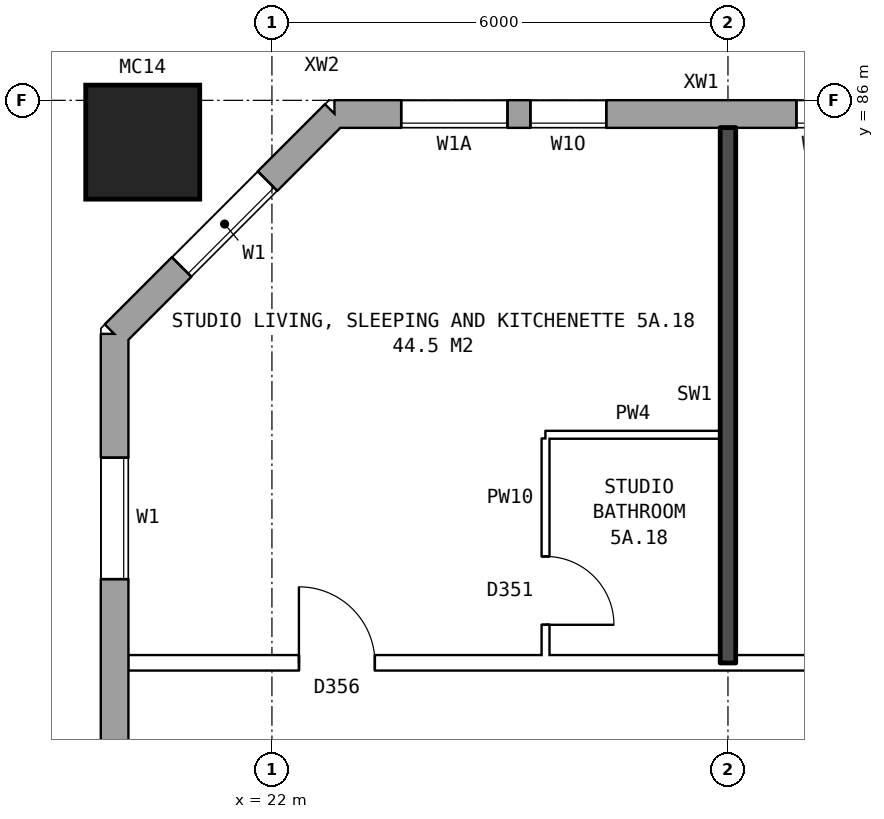
"""IFC4 building model, lengths in metres.
Left out: names, types, materials, properties, quantities, classifications, styles, units other than length and angle.
Written with IfcOpenShell. Run it as: python <this file> out.ifc"""

import sys

from ifc_helpers import new_model, si_unit, direction, frame, frame_2d, origin, origin_2d, place, context, subcontext, project, spatial, rectangle, hollow_rectangle, extrude, element, fill, save


model = new_model("IFC4")
c1 = context("Model", 3, precision=1e-05, world=origin(), true_north=direction((0.0, 1.0)))
c2 = subcontext(c1, "Body", "Model", "MODEL_VIEW")
j1 = project(units=[si_unit("LENGTHUNIT", "METRE"), si_unit("PLANEANGLEUNIT", "RADIAN")], contexts=[c1])
p1 = place(None, origin())
s1 = spatial("IfcSite", under=j1, at=p1, CompositionType="ELEMENT")
p2 = place(p1, origin())
s2 = spatial("IfcBuilding", under=s1, at=p2, CompositionType="ELEMENT")
p3 = place(p2, frame((0.0, 0.0, 22.6)))
s3 = spatial("IfcBuildingStorey", under=s2, at=p3, CompositionType="ELEMENT", Elevation=22.6)
p4 = place(p3, frame((20.3, 85.45, 0.0), z_axis=(0.0, 0.0, 1.0), x_axis=(1.0, 0.0, 0.0)))
e1 = element("IfcColumn", 1, at=p4, inside=s3, PredefinedType="COLUMN", context=c2, shape_type="SweptSolid", body=[
    extrude(hollow_rectangle(XDim=1.5, YDim=1.5, WallThickness=0.08, at=origin_2d()), origin(), (0.0, 0.0, 1.0), 3.1),
])
p5 = place(p3, frame((72.925, 85.82, 0.0), z_axis=(0.0, 0.0, 1.0), x_axis=(-1.0, 0.0, 0.0)))
e2 = element("IfcWall", 2, at=p5, inside=s3, PredefinedType="STANDARD", context=c2, shape_type="SweptSolid", body=[
    extrude(rectangle(XDim=50.101, YDim=0.36, at=frame_2d((25.05, 0.0))), origin(), (0.0, 0.0, 1.0), 2.85),
])
p6 = place(p5, frame((0.625, 0.0, 0.8)))
e3 = element("IfcOpeningElement", 3, at=p6, cuts=e2, PredefinedType="OPENING", context=c2, shape_type="SweptSolid", body=[
    extrude(rectangle(XDim=1.6, YDim=1.8, at=frame_2d((0.8, 0.9))), frame((0.0, 0.19, 0.0), z_axis=(0.0, -1.0, 0.0), x_axis=(1.0, 0.0, 0.0)), (0.0, 0.0, 1.0), 0.38),
])
p7 = place(p5, frame((3.125, 0.0, 1.7)))
e4 = element("IfcOpeningElement", 4, at=p7, cuts=e2, PredefinedType="OPENING", context=c2, shape_type="SweptSolid", body=[
    extrude(rectangle(XDim=0.8, YDim=0.9, at=frame_2d((0.4, 0.45))), frame((0.0, 0.19, 0.0), z_axis=(0.0, -1.0, 0.0), x_axis=(1.0, 0.0, 0.0)), (0.0, 0.0, 1.0), 0.38),
])
p8 = place(p5, frame((6.625, 0.0, 0.8)))
e5 = element("IfcOpeningElement", 5, at=p8, cuts=e2, PredefinedType="OPENING", context=c2, shape_type="SweptSolid", body=[
    extrude(rectangle(XDim=1.6, YDim=1.8, at=frame_2d((0.8, 0.9))), frame((0.0, 0.19, 0.0), z_axis=(0.0, -1.0, 0.0), x_axis=(1.0, 0.0, 0.0)), (0.0, 0.0, 1.0), 0.38),
])
p9 = place(p5, frame((9.625, 0.0, 0.8)))
e6 = element("IfcOpeningElement", 6, at=p9, cuts=e2, PredefinedType="OPENING", context=c2, shape_type="SweptSolid", body=[
    extrude(rectangle(XDim=1.6, YDim=1.8, at=frame_2d((0.8, 0.9))), frame((0.0, 0.19, 0.0), z_axis=(0.0, -1.0, 0.0), x_axis=(1.0, 0.0, 0.0)), (0.0, 0.0, 1.0), 0.38),
])
p10 = place(p5, frame((12.625, 0.0, 0.8)))
e7 = element("IfcOpeningElement", 7, at=p10, cuts=e2, PredefinedType="OPENING", context=c2, shape_type="SweptSolid", body=[
    extrude(rectangle(XDim=1.6, YDim=1.8, at=frame_2d((0.8, 0.9))), frame((0.0, 0.19, 0.0), z_axis=(0.0, -1.0, 0.0), x_axis=(1.0, 0.0, 0.0)), (0.0, 0.0, 1.0), 0.38),
])
p11 = place(p5, frame((15.625, 0.0, 0.8)))
e8 = element("IfcOpeningElement", 8, at=p11, cuts=e2, PredefinedType="OPENING", context=c2, shape_type="SweptSolid", body=[
    extrude(rectangle(XDim=1.6, YDim=1.8, at=frame_2d((0.8, 0.9))), frame((0.0, 0.19, 0.0), z_axis=(0.0, -1.0, 0.0), x_axis=(1.0, 0.0, 0.0)), (0.0, 0.0, 1.0), 0.38),
])
p12 = place(p5, frame((18.625, 0.0, 0.8)))
e9 = element("IfcOpeningElement", 9, at=p12, cuts=e2, PredefinedType="OPENING", context=c2, shape_type="SweptSolid", body=[
    extrude(rectangle(XDim=1.6, YDim=1.8, at=frame_2d((0.8, 0.9))), frame((0.0, 0.19, 0.0), z_axis=(0.0, -1.0, 0.0), x_axis=(1.0, 0.0, 0.0)), (0.0, 0.0, 1.0), 0.38),
])
p13 = place(p5, frame((21.625, 0.0, 0.8)))
e10 = element("IfcOpeningElement", 10, at=p13, cuts=e2, PredefinedType="OPENING", context=c2, shape_type="SweptSolid", body=[
    extrude(rectangle(XDim=1.6, YDim=1.8, at=frame_2d((0.8, 0.9))), frame((0.0, 0.19, 0.0), z_axis=(0.0, -1.0, 0.0), x_axis=(1.0, 0.0, 0.0)), (0.0, 0.0, 1.0), 0.38),
])
p14 = place(p5, frame((24.625, 0.0, 0.8)))
e11 = element("IfcOpeningElement", 11, at=p14, cuts=e2, PredefinedType="OPENING", context=c2, shape_type="SweptSolid", body=[
    extrude(rectangle(XDim=1.6, YDim=1.8, at=frame_2d((0.8, 0.9))), frame((0.0, 0.19, 0.0), z_axis=(0.0, -1.0, 0.0), x_axis=(1.0, 0.0, 0.0)), (0.0, 0.0, 1.0), 0.38),
])
p15 = place(p5, frame((27.625, 0.0, 0.8)))
e12 = element("IfcOpeningElement", 12, at=p15, cuts=e2, PredefinedType="OPENING", context=c2, shape_type="SweptSolid", body=[
    extrude(rectangle(XDim=1.6, YDim=1.8, at=frame_2d((0.8, 0.9))), frame((0.0, 0.19, 0.0), z_axis=(0.0, -1.0, 0.0), x_axis=(1.0, 0.0, 0.0)), (0.0, 0.0, 1.0), 0.38),
])
p16 = place(p5, frame((30.625, 0.0, 0.8)))
e13 = element("IfcOpeningElement", 13, at=p16, cuts=e2, PredefinedType="OPENING", context=c2, shape_type="SweptSolid", body=[
    extrude(rectangle(XDim=1.6, YDim=1.8, at=frame_2d((0.8, 0.9))), frame((0.0, 0.19, 0.0), z_axis=(0.0, -1.0, 0.0), x_axis=(1.0, 0.0, 0.0)), (0.0, 0.0, 1.0), 0.38),
])
p17 = place(p5, frame((33.625, 0.0, 0.8)))
e14 = element("IfcOpeningElement", 14, at=p17, cuts=e2, PredefinedType="OPENING", context=c2, shape_type="SweptSolid", body=[
    extrude(rectangle(XDim=1.6, YDim=1.8, at=frame_2d((0.8, 0.9))), frame((0.0, 0.19, 0.0), z_axis=(0.0, -1.0, 0.0), x_axis=(1.0, 0.0, 0.0)), (0.0, 0.0, 1.0), 0.38),
])
p18 = place(p5, frame((36.625, 0.0, 0.8)))
e15 = element("IfcOpeningElement", 15, at=p18, cuts=e2, PredefinedType="OPENING", context=c2, shape_type="SweptSolid", body=[
    extrude(rectangle(XDim=1.6, YDim=1.8, at=frame_2d((0.8, 0.9))), frame((0.0, 0.19, 0.0), z_axis=(0.0, -1.0, 0.0), x_axis=(1.0, 0.0, 0.0)), (0.0, 0.0, 1.0), 0.38),
])
p19 = place(p5, frame((39.625, 0.0, 0.8)))
e16 = element("IfcOpeningElement", 16, at=p19, cuts=e2, PredefinedType="OPENING", context=c2, shape_type="SweptSolid", body=[
    extrude(rectangle(XDim=1.6, YDim=1.8, at=frame_2d((0.8, 0.9))), frame((0.0, 0.19, 0.0), z_axis=(0.0, -1.0, 0.0), x_axis=(1.0, 0.0, 0.0)), (0.0, 0.0, 1.0), 0.38),
])
p20 = place(p5, frame((41.525, 0.0, 0.8)))
e17 = element("IfcOpeningElement", 17, at=p20, cuts=e2, PredefinedType="OPENING", context=c2, shape_type="SweptSolid", body=[
    extrude(rectangle(XDim=1.6, YDim=1.8, at=frame_2d((0.8, 0.9))), frame((0.0, 0.19, 0.0), z_axis=(0.0, -1.0, 0.0), x_axis=(1.0, 0.0, 0.0)), (0.0, 0.0, 1.0), 0.38),
])
p21 = place(p5, frame((46.525, 0.0, 1.4)))
e18 = element("IfcOpeningElement", 18, at=p21, cuts=e2, PredefinedType="OPENING", context=c2, shape_type="SweptSolid", body=[
    extrude(rectangle(XDim=1.0, YDim=1.2, at=frame_2d((0.5, 0.6))), frame((0.0, 0.19, 0.0), z_axis=(0.0, -1.0, 0.0), x_axis=(1.0, 0.0, 0.0)), (0.0, 0.0, 1.0), 0.38),
])
p22 = place(p5, frame((5.475, 0.0, 0.8)))
e19 = element("IfcOpeningElement", 19, at=p22, cuts=e2, PredefinedType="OPENING", context=c2, shape_type="SweptSolid", body=[
    extrude(rectangle(XDim=0.8, YDim=0.9, at=frame_2d((0.4, 0.45))), frame((0.0, 0.19, 0.0), z_axis=(0.0, -1.0, 0.0), x_axis=(1.0, 0.0, 0.0)), (0.0, 0.0, 1.0), 0.38),
])
p23 = place(p5, frame((43.425, 0.0, 0.8)))
e20 = element("IfcOpeningElement", 20, at=p23, cuts=e2, PredefinedType="OPENING", context=c2, shape_type="SweptSolid", body=[
    extrude(rectangle(XDim=0.6, YDim=1.2, at=frame_2d((0.3, 0.6))), frame((0.0, 0.19, 0.0), z_axis=(0.0, -1.0, 0.0), x_axis=(1.0, 0.0, 0.0)), (0.0, 0.0, 1.0), 0.38),
])
p24 = place(p5, frame((47.825, 0.0, 0.8)))
e21 = element("IfcOpeningElement", 21, at=p24, cuts=e2, PredefinedType="OPENING", context=c2, shape_type="SweptSolid", body=[
    extrude(rectangle(XDim=1.4, YDim=1.8, at=frame_2d((0.7, 0.9))), frame((0.0, 0.19, 0.0), z_axis=(0.0, -1.0, 0.0), x_axis=(1.0, 0.0, 0.0)), (0.0, 0.0, 1.0), 0.38),
])
p25 = place(p3, frame((22.825, 85.82, 0.0), z_axis=(0.0, 0.0, 1.0), x_axis=(-0.707106781187, -0.707106781187, 0.0)))
e22 = element("IfcWall", 22, at=p25, inside=s3, PredefinedType="STANDARD", context=c2, shape_type="SweptSolid", body=[
    extrude(rectangle(XDim=4.094, YDim=0.36, at=frame_2d((2.047, 0.0))), origin(), (0.0, 0.0, 1.0), 2.85),
])
p26 = place(p25, frame((1.247, 0.0, 0.8)))
e23 = element("IfcOpeningElement", 23, at=p26, cuts=e22, PredefinedType="OPENING", context=c2, shape_type="SweptSolid", body=[
    extrude(rectangle(XDim=1.6, YDim=1.8, at=frame_2d((0.8, 0.9))), frame((0.0, 0.19, 0.0), z_axis=(0.0, -1.0, 0.0), x_axis=(1.0, 0.0, 0.0)), (0.0, 0.0, 1.0), 0.38),
])
p27 = place(p3, frame((19.93, 82.925, 0.0), z_axis=(0.0, 0.0, 1.0), x_axis=(0.0, -1.0, 0.0)))
e24 = element("IfcWall", 24, at=p27, inside=s3, PredefinedType="STANDARD", context=c2, shape_type="SweptSolid", body=[
    extrude(rectangle(XDim=25.851, YDim=0.36, at=frame_2d((12.925, 0.0))), origin(), (0.0, 0.0, 1.0), 2.85),
])
p28 = place(p27, frame((1.625, 0.0, 0.8)))
e25 = element("IfcOpeningElement", 25, at=p28, cuts=e24, PredefinedType="OPENING", context=c2, shape_type="SweptSolid", body=[
    extrude(rectangle(XDim=1.6, YDim=1.8, at=frame_2d((0.8, 0.9))), frame((0.0, 0.19, 0.0), z_axis=(0.0, -1.0, 0.0), x_axis=(1.0, 0.0, 0.0)), (0.0, 0.0, 1.0), 0.38),
])
p29 = place(p27, frame((6.225, 0.0, 0.8)))
e26 = element("IfcOpeningElement", 26, at=p29, cuts=e24, PredefinedType="OPENING", context=c2, shape_type="SweptSolid", body=[
    extrude(rectangle(XDim=1.0, YDim=0.9, at=frame_2d((0.5, 0.45))), frame((0.0, 0.19, 0.0), z_axis=(0.0, -1.0, 0.0), x_axis=(1.0, 0.0, 0.0)), (0.0, 0.0, 1.0), 0.38),
])
p30 = place(p27, frame((7.625, 0.0, 0.8)))
e27 = element("IfcOpeningElement", 27, at=p30, cuts=e24, PredefinedType="OPENING", context=c2, shape_type="SweptSolid", body=[
    extrude(rectangle(XDim=1.6, YDim=1.8, at=frame_2d((0.8, 0.9))), frame((0.0, 0.19, 0.0), z_axis=(0.0, -1.0, 0.0), x_axis=(1.0, 0.0, 0.0)), (0.0, 0.0, 1.0), 0.38),
])
p31 = place(p27, frame((10.625, 0.0, 0.8)))
e28 = element("IfcOpeningElement", 28, at=p31, cuts=e24, PredefinedType="OPENING", context=c2, shape_type="SweptSolid", body=[
    extrude(rectangle(XDim=1.6, YDim=1.8, at=frame_2d((0.8, 0.9))), frame((0.0, 0.19, 0.0), z_axis=(0.0, -1.0, 0.0), x_axis=(1.0, 0.0, 0.0)), (0.0, 0.0, 1.0), 0.38),
])
p32 = place(p27, frame((13.625, 0.0, 0.8)))
e29 = element("IfcOpeningElement", 29, at=p32, cuts=e24, PredefinedType="OPENING", context=c2, shape_type="SweptSolid", body=[
    extrude(rectangle(XDim=1.6, YDim=1.8, at=frame_2d((0.8, 0.9))), frame((0.0, 0.19, 0.0), z_axis=(0.0, -1.0, 0.0), x_axis=(1.0, 0.0, 0.0)), (0.0, 0.0, 1.0), 0.38),
])
p33 = place(p27, frame((16.625, 0.0, 0.8)))
e30 = element("IfcOpeningElement", 30, at=p33, cuts=e24, PredefinedType="OPENING", context=c2, shape_type="SweptSolid", body=[
    extrude(rectangle(XDim=1.6, YDim=1.8, at=frame_2d((0.8, 0.9))), frame((0.0, 0.19, 0.0), z_axis=(0.0, -1.0, 0.0), x_axis=(1.0, 0.0, 0.0)), (0.0, 0.0, 1.0), 0.38),
])
p34 = place(p27, frame((9.525, 0.0, 0.8)))
e31 = element("IfcOpeningElement", 31, at=p34, cuts=e24, PredefinedType="OPENING", context=c2, shape_type="SweptSolid", body=[
    extrude(rectangle(XDim=0.8, YDim=1.8, at=frame_2d((0.4, 0.9))), frame((0.0, 0.19, 0.0), z_axis=(0.0, -1.0, 0.0), x_axis=(1.0, 0.0, 0.0)), (0.0, 0.0, 1.0), 0.38),
])
p35 = place(p27, frame((22.625, 0.0, 0.8)))
e32 = element("IfcOpeningElement", 32, at=p35, cuts=e24, PredefinedType="OPENING", context=c2, shape_type="SweptSolid", body=[
    extrude(rectangle(XDim=1.6, YDim=1.8, at=frame_2d((0.8, 0.9))), frame((0.0, 0.19, 0.0), z_axis=(0.0, -1.0, 0.0), x_axis=(1.0, 0.0, 0.0)), (0.0, 0.0, 1.0), 0.38),
])
p36 = place(p27, frame((12.525, 0.0, 0.8)))
e33 = element("IfcOpeningElement", 33, at=p36, cuts=e24, PredefinedType="OPENING", context=c2, shape_type="SweptSolid", body=[
    extrude(rectangle(XDim=0.8, YDim=1.8, at=frame_2d((0.4, 0.9))), frame((0.0, 0.19, 0.0), z_axis=(0.0, -1.0, 0.0), x_axis=(1.0, 0.0, 0.0)), (0.0, 0.0, 1.0), 0.38),
])
p37 = place(p27, frame((15.525, 0.0, 0.8)))
e34 = element("IfcOpeningElement", 34, at=p37, cuts=e24, PredefinedType="OPENING", context=c2, shape_type="SweptSolid", body=[
    extrude(rectangle(XDim=0.8, YDim=1.8, at=frame_2d((0.4, 0.9))), frame((0.0, 0.19, 0.0), z_axis=(0.0, -1.0, 0.0), x_axis=(1.0, 0.0, 0.0)), (0.0, 0.0, 1.0), 0.38),
])
p38 = place(p27, frame((18.525, 0.0, 0.8)))
e35 = element("IfcOpeningElement", 35, at=p38, cuts=e24, PredefinedType="OPENING", context=c2, shape_type="SweptSolid", body=[
    extrude(rectangle(XDim=1.0, YDim=0.9, at=frame_2d((0.5, 0.45))), frame((0.0, 0.19, 0.0), z_axis=(0.0, -1.0, 0.0), x_axis=(1.0, 0.0, 0.0)), (0.0, 0.0, 1.0), 0.38),
])
p39 = place(p3, frame((20.11, 78.6, 0.0), z_axis=(0.0, 0.0, 1.0), x_axis=(1.0, 0.0, 0.0)))
e36 = element("IfcWall", 36, at=p39, inside=s3, PredefinedType="PARTITIONING", context=c2, shape_type="SweptSolid", body=[
    extrude(rectangle(XDim=25.79, YDim=0.2, at=frame_2d((12.895, 0.0))), origin(), (0.0, 0.0, 1.0), 2.85),
])
p40 = place(p39, frame((22.34, 0.0, 0.0)))
e37 = element("IfcOpeningElement", 37, at=p40, cuts=e36, PredefinedType="OPENING", context=c2, shape_type="SweptSolid", body=[
    extrude(rectangle(XDim=1.0, YDim=2.1, at=frame_2d((0.5, 1.05))), frame((0.0, 0.11, 0.0), z_axis=(0.0, -1.0, 0.0), x_axis=(1.0, 0.0, 0.0)), (0.0, 0.0, 1.0), 0.22),
])
p41 = place(p39, frame((10.39, 0.0, 0.0)))
e38 = element("IfcOpeningElement", 38, at=p41, cuts=e36, PredefinedType="OPENING", context=c2, shape_type="SweptSolid", body=[
    extrude(rectangle(XDim=1.0, YDim=2.1, at=frame_2d((0.5, 1.05))), frame((0.0, 0.11, 0.0), z_axis=(0.0, -1.0, 0.0), x_axis=(1.0, 0.0, 0.0)), (0.0, 0.0, 1.0), 0.22),
])
p42 = place(p39, frame((2.245, 0.0, 0.0)))
e39 = element("IfcOpeningElement", 39, at=p42, cuts=e36, PredefinedType="OPENING", context=c2, shape_type="SweptSolid", body=[
    extrude(rectangle(XDim=1.0, YDim=2.1, at=frame_2d((0.5, 1.05))), frame((0.0, 0.11, 0.0), z_axis=(0.0, -1.0, 0.0), x_axis=(1.0, 0.0, 0.0)), (0.0, 0.0, 1.0), 0.22),
])
p43 = place(p3, frame((25.6, 81.6, 0.0), z_axis=(0.0, 0.0, 1.0), x_axis=(1.0, 0.0, 0.0)))
e40 = element("IfcWall", 40, at=p43, inside=s3, PredefinedType="PARTITIONING", context=c2, shape_type="SweptSolid", body=[
    extrude(rectangle(XDim=2.3, YDim=0.1, at=frame_2d((1.15, 0.0))), origin(), (0.0, 0.0, 1.0), 2.85),
])
p44 = place(p3, frame((25.6, 78.7, 0.0), z_axis=(0.0, 0.0, 1.0), x_axis=(0.0, 1.0, 0.0)))
e41 = element("IfcWall", 41, at=p44, inside=s3, PredefinedType="PARTITIONING", context=c2, shape_type="SweptSolid", body=[
    extrude(rectangle(XDim=2.85, YDim=0.1, at=frame_2d((1.425, 0.0))), origin(), (0.0, 0.0, 1.0), 2.85),
])
p45 = place(p44, frame((0.4, 0.0, 0.0)))
e42 = element("IfcOpeningElement", 42, at=p45, cuts=e41, PredefinedType="OPENING", context=c2, shape_type="SweptSolid", body=[
    extrude(rectangle(XDim=0.9, YDim=2.1, at=frame_2d((0.45, 1.05))), frame((0.0, 0.06, 0.0), z_axis=(0.0, -1.0, 0.0), x_axis=(1.0, 0.0, 0.0)), (0.0, 0.0, 1.0), 0.12),
])
p46 = place(p3, frame((28.0, 78.6, 0.0), z_axis=(0.0, 0.0, 1.0), x_axis=(0.0, 1.0, 0.0)))
e43 = element("IfcWall", 43, at=p46, inside=s3, PredefinedType="SOLIDWALL", context=c2, shape_type="SweptSolid", body=[
    extrude(rectangle(XDim=7.04, YDim=0.2, at=frame_2d((3.52, 0.0))), origin(), (0.0, 0.0, 1.0), 2.85),
])
p47 = place(p21, origin())
e44 = element("IfcWindow", 44, at=p47, inside=s3, PartitioningType="SINGLE_PANEL", PredefinedType="WINDOW", context=c2, shape_type="SweptSolid", body=[
    extrude(rectangle(XDim=1.0, YDim=1.2, at=frame_2d((0.5, 0.6))), frame((0.0, 0.15, 0.0), z_axis=(0.0, -1.0, 0.0), x_axis=(1.0, 0.0, 0.0)), (0.0, 0.0, 1.0), 0.06),
])
fill(e18, e44)
p48 = place(p26, origin())
e45 = element("IfcWindow", 45, at=p48, inside=s3, PartitioningType="SINGLE_PANEL", PredefinedType="WINDOW", context=c2, shape_type="SweptSolid", body=[
    extrude(rectangle(XDim=1.6, YDim=1.8, at=frame_2d((0.8, 0.9))), frame((0.0, 0.15, 0.0), z_axis=(0.0, -1.0, 0.0), x_axis=(1.0, 0.0, 0.0)), (0.0, 0.0, 1.0), 0.06),
])
fill(e23, e45)
p49 = place(p28, origin())
e46 = element("IfcWindow", 46, at=p49, inside=s3, PartitioningType="SINGLE_PANEL", PredefinedType="WINDOW", context=c2, shape_type="SweptSolid", body=[
    extrude(rectangle(XDim=1.6, YDim=1.8, at=frame_2d((0.8, 0.9))), frame((0.0, 0.15, 0.0), z_axis=(0.0, -1.0, 0.0), x_axis=(1.0, 0.0, 0.0)), (0.0, 0.0, 1.0), 0.06),
])
fill(e25, e46)
p50 = place(p42, origin())
e47 = element("IfcDoor", 47, at=p50, inside=s3, OperationType="SINGLE_SWING_LEFT", PredefinedType="DOOR", context=c2, shape_type="SweptSolid", body=[
    extrude(rectangle(XDim=1.0, YDim=2.1, at=frame_2d((0.5, 1.05))), frame((0.0, 0.025, 0.0), z_axis=(0.0, -1.0, 0.0), x_axis=(1.0, 0.0, 0.0)), (0.0, 0.0, 1.0), 0.05),
])
fill(e39, e47)
p51 = place(p45, frame((0.9, 0.0, 0.0), z_axis=(0.0, 0.0, 1.0), x_axis=(-1.0, 0.0, 0.0)))
e48 = element("IfcDoor", 48, at=p51, inside=s3, OperationType="SINGLE_SWING_RIGHT", PredefinedType="DOOR", context=c2, shape_type="SweptSolid", body=[
    extrude(rectangle(XDim=0.9, YDim=2.1, at=frame_2d((0.45, 1.05))), frame((0.0, 0.025, 0.0), z_axis=(0.0, -1.0, 0.0), x_axis=(1.0, 0.0, 0.0)), (0.0, 0.0, 1.0), 0.05),
])
fill(e42, e48)
p52 = place(p23, origin())
e49 = element("IfcWindow", 49, at=p52, inside=s3, PartitioningType="SINGLE_PANEL", PredefinedType="WINDOW", context=c2, shape_type="SweptSolid", body=[
    extrude(rectangle(XDim=0.6, YDim=1.2, at=frame_2d((0.3, 0.6))), frame((0.0, 0.15, 0.0), z_axis=(0.0, -1.0, 0.0), x_axis=(1.0, 0.0, 0.0)), (0.0, 0.0, 1.0), 0.06),
])
fill(e20, e49)
p53 = place(p24, origin())
e50 = element("IfcWindow", 50, at=p53, inside=s3, PartitioningType="SINGLE_PANEL", PredefinedType="WINDOW", context=c2, shape_type="SweptSolid", body=[
    extrude(rectangle(XDim=1.4, YDim=1.8, at=frame_2d((0.7, 0.9))), frame((0.0, 0.15, 0.0), z_axis=(0.0, -1.0, 0.0), x_axis=(1.0, 0.0, 0.0)), (0.0, 0.0, 1.0), 0.06),
])
fill(e21, e50)
save(model, sys.argv[1])
